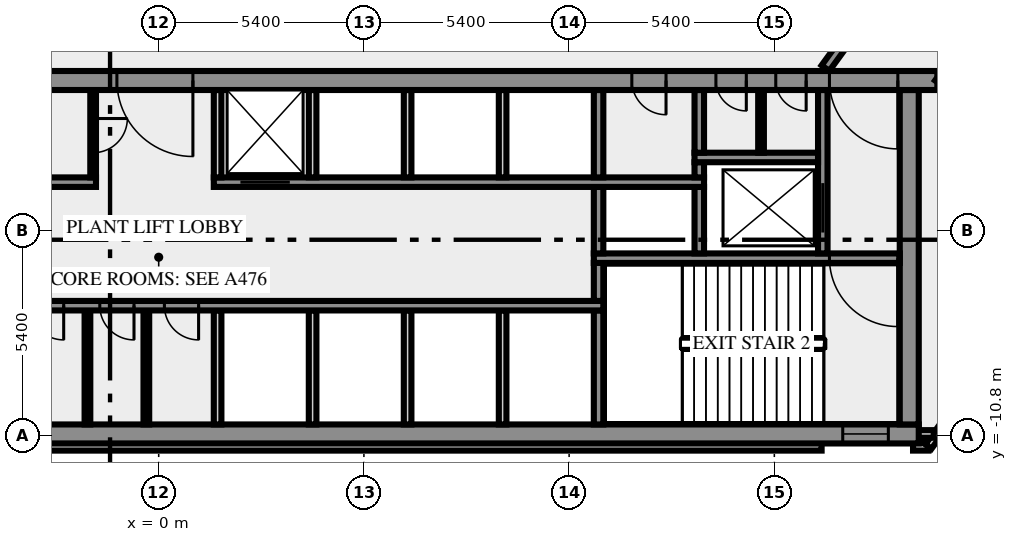
"""IFC4 building model, lengths in metres.
Left out: names, types, materials, properties, quantities, classifications, styles, units other than length and angle.
Written with IfcOpenShell. Run it as: python <this file> out.ifc"""

import sys

from ifc_helpers import new_model, si_unit, direction, frame, frame_2d, origin, place, context, subcontext, project, spatial, rectangle, extrude, element, fill, save


model = new_model("IFC4")
c1 = context("Model", 3, precision=1e-05, world=origin(), true_north=direction((0.0, 1.0)))
c2 = subcontext(c1, "Body", "Model", "MODEL_VIEW")
j1 = project(units=[si_unit("LENGTHUNIT", "METRE"), si_unit("PLANEANGLEUNIT", "RADIAN")], contexts=[c1])
p1 = place(None, origin())
s1 = spatial("IfcSite", under=j1, at=p1, CompositionType="ELEMENT")
p2 = place(p1, origin())
s2 = spatial("IfcBuilding", under=s1, at=p2, CompositionType="ELEMENT")
p3 = place(p2, frame((0.0, 0.0, 133.0)))
s3 = spatial("IfcBuildingStorey", under=s2, at=p3, CompositionType="ELEMENT", Elevation=133.0)
p4 = place(p3, frame((-17.444, -11.088, 0.0), z_axis=(0.0, 0.0, 1.0), x_axis=(1.0, 0.0, 0.0)))
e1 = element("IfcWall", 1, at=p4, inside=s3, PredefinedType="SOLIDWALL", context=c2, shape_type="SweptSolid", body=[
    extrude(rectangle(XDim=34.888, YDim=0.2, at=frame_2d((17.444, 0.0))), origin(), (0.0, 0.0, 1.0), 5.6),
])
p5 = place(p3, frame((19.85, -11.088, 0.0), z_axis=(0.0, 0.0, 1.0), x_axis=(1.0, 0.0, 0.0)))
e2 = element("IfcWall", 2, at=p5, inside=s3, PredefinedType="SOLIDWALL", context=c2, shape_type="SweptSolid", body=[
    extrude(rectangle(XDim=0.406, YDim=0.2, at=frame_2d((0.203, 0.0))), origin(), (0.0, 0.0, 1.0), 5.6),
])
p6 = place(p3, frame((20.253, -11.083, 0.0), z_axis=(0.0, 0.0, 1.0), x_axis=(0.587766567315, 0.809030569476, 0.0)))
e3 = element("IfcWall", 3, at=p6, inside=s3, PredefinedType="SOLIDWALL", context=c2, shape_type="SweptSolid", body=[
    extrude(rectangle(XDim=2.688, YDim=0.2, at=frame_2d((1.344, 0.0))), origin(), (0.0, 0.0, 1.0), 5.6),
])
p7 = place(p3, frame((19.98, -10.75, 0.0), z_axis=(0.0, 0.0, 1.0), x_axis=(1.0, 0.0, 0.0)))
e4 = element("IfcWall", 4, at=p7, inside=s3, PredefinedType="SOLIDWALL", context=c2, shape_type="SweptSolid", body=[
    extrude(rectangle(XDim=0.417, YDim=0.2, at=frame_2d((0.208, 0.0))), origin(), (0.0, 0.0, 1.0), 5.6),
])
p8 = place(p3, frame((-20.0, -10.75, 0.0), z_axis=(0.0, 0.0, 1.0), x_axis=(1.0, 0.0, 0.0)))
e5 = element("IfcWall", 5, at=p8, inside=s3, PredefinedType="SHEAR", context=c2, shape_type="SweptSolid", body=[
    extrude(rectangle(XDim=40.0, YDim=0.5, at=frame_2d((20.0, 0.0))), origin(), (0.0, 0.0, 1.0), 5.6),
])
p9 = place(p8, frame((0.8, 0.0, 1.0)))
e6 = element("IfcOpeningElement", 6, at=p9, cuts=e5, PredefinedType="OPENING", context=c2, shape_type="SweptSolid", body=[
    extrude(rectangle(XDim=1.2, YDim=1.2, at=frame_2d((0.6, 0.6))), frame((0.0, 0.26, 0.0), z_axis=(0.0, -1.0, 0.0), x_axis=(1.0, 0.0, 0.0)), (0.0, 0.0, 1.0), 0.52),
])
p10 = place(p8, frame((38.0, 0.0, 1.0)))
e7 = element("IfcOpeningElement", 7, at=p10, cuts=e5, PredefinedType="OPENING", context=c2, shape_type="SweptSolid", body=[
    extrude(rectangle(XDim=1.2, YDim=1.2, at=frame_2d((0.6, 0.6))), frame((0.0, 0.26, 0.0), z_axis=(0.0, -1.0, 0.0), x_axis=(1.0, 0.0, 0.0)), (0.0, 0.0, 1.0), 0.52),
])
for number, where, z_axis, x_axis in (
    (8, (-1.875, -10.5, 0.0), (0.0, 0.0, 1.0), (0.0, 1.0, 0.0)),
    (9, (-0.325, -10.5, 0.0), (0.0, 0.0, 1.0), (0.0, 1.0, 0.0)),
):
    element("IfcWall", number, at=place(p3, frame(where, z_axis=z_axis, x_axis=x_axis)), inside=s3, PredefinedType="PARTITIONING", context=c2, shape_type="SweptSolid", body=[
        extrude(rectangle(XDim=3.0, YDim=0.15, at=frame_2d((1.5, 0.0))), origin(), (0.0, 0.0, 1.0), 5.6),
    ])
for number, where, z_axis, x_axis in (
    (10, (1.55, -10.5, 0.0), (0.0, 0.0, 1.0), (0.0, 1.0, 0.0)),
    (11, (4.05, -10.5, 0.0), (0.0, 0.0, 1.0), (0.0, 1.0, 0.0)),
    (12, (6.55, -10.5, 0.0), (0.0, 0.0, 1.0), (0.0, 1.0, 0.0)),
    (13, (9.05, -10.5, 0.0), (0.0, 0.0, 1.0), (0.0, 1.0, 0.0)),
):
    element("IfcWall", number, at=place(p3, frame(where, z_axis=z_axis, x_axis=x_axis)), inside=s3, PredefinedType="SOLIDWALL", context=c2, shape_type="SweptSolid", body=[
        extrude(rectangle(XDim=3.0, YDim=0.2, at=frame_2d((1.5, 0.0))), origin(), (0.0, 0.0, 1.0), 5.6),
    ])
p11 = place(p3, frame((11.575, -10.5, 0.0), z_axis=(0.0, 0.0, 1.0), x_axis=(0.0, 1.0, 0.0)))
e14 = element("IfcWall", 14, at=p11, inside=s3, PredefinedType="SHEAR", context=c2, shape_type="SweptSolid", body=[
    extrude(rectangle(XDim=3.0, YDim=0.25, at=frame_2d((1.5, 0.0))), origin(), (0.0, 0.0, 1.0), 5.6),
])
p12 = place(p3, frame((19.75, -10.5, 0.0), z_axis=(0.0, 0.0, 1.0), x_axis=(0.0, 1.0, 0.0)))
e15 = element("IfcWall", 15, at=p12, inside=s3, PredefinedType="SHEAR", context=c2, shape_type="SweptSolid", body=[
    extrude(rectangle(XDim=8.8, YDim=0.5, at=frame_2d((4.4, 0.0))), origin(), (0.0, 0.0, 1.0), 5.6),
])
p13 = place(p3, frame((11.7, -7.375, 0.0), z_axis=(0.0, 0.0, 1.0), x_axis=(-1.0, 0.0, 0.0)))
e16 = element("IfcWall", 16, at=p13, inside=s3, PredefinedType="SHEAR", context=c2, shape_type="SweptSolid", body=[
    extrude(rectangle(XDim=23.4, YDim=0.25, at=frame_2d((11.7, 0.0))), origin(), (0.0, 0.0, 1.0), 5.6),
])
p14 = place(p13, frame((14.2, 0.0, 0.0)))
e17 = element("IfcOpeningElement", 17, at=p14, cuts=e16, PredefinedType="OPENING", context=c2, shape_type="SweptSolid", body=[
    extrude(rectangle(XDim=0.9, YDim=2.1, at=frame_2d((0.45, 1.05))), frame((0.0, 0.135, 0.0), z_axis=(0.0, -1.0, 0.0), x_axis=(1.0, 0.0, 0.0)), (0.0, 0.0, 1.0), 0.27),
])
p15 = place(p13, frame((12.35, 0.0, 0.0)))
e18 = element("IfcOpeningElement", 18, at=p15, cuts=e16, PredefinedType="OPENING", context=c2, shape_type="SweptSolid", body=[
    extrude(rectangle(XDim=0.9, YDim=2.1, at=frame_2d((0.45, 1.05))), frame((0.0, 0.135, 0.0), z_axis=(0.0, -1.0, 0.0), x_axis=(1.0, 0.0, 0.0)), (0.0, 0.0, 1.0), 0.27),
])
p16 = place(p13, frame((10.65, 0.0, 0.0)))
e19 = element("IfcOpeningElement", 19, at=p16, cuts=e16, PredefinedType="OPENING", context=c2, shape_type="SweptSolid", body=[
    extrude(rectangle(XDim=0.9, YDim=2.1, at=frame_2d((0.45, 1.05))), frame((0.0, 0.135, 0.0), z_axis=(0.0, -1.0, 0.0), x_axis=(1.0, 0.0, 0.0)), (0.0, 0.0, 1.0), 0.27),
])
p17 = place(p3, frame((11.575, -7.25, 0.0), z_axis=(0.0, 0.0, 1.0), x_axis=(0.0, 1.0, 0.0)))
e20 = element("IfcWall", 20, at=p17, inside=s3, PredefinedType="SHEAR", context=c2, shape_type="SweptSolid", body=[
    extrude(rectangle(XDim=1.0, YDim=0.25, at=frame_2d((0.5, 0.0))), origin(), (0.0, 0.0, 1.0), 5.6),
])
p18 = place(p3, frame((19.5, -6.125, 0.0), z_axis=(0.0, 0.0, 1.0), x_axis=(-1.0, 0.0, 0.0)))
e21 = element("IfcWall", 21, at=p18, inside=s3, PredefinedType="SHEAR", context=c2, shape_type="SweptSolid", body=[
    extrude(rectangle(XDim=8.05, YDim=0.25, at=frame_2d((4.025, 0.0))), origin(), (0.0, 0.0, 1.0), 5.6),
])
p19 = place(p18, frame((0.05, 0.0, 0.0)))
e22 = element("IfcOpeningElement", 22, at=p19, cuts=e21, PredefinedType="OPENING", context=c2, shape_type="SweptSolid", body=[
    extrude(rectangle(XDim=1.8, YDim=2.1, at=frame_2d((0.9, 1.05))), frame((0.0, 0.135, 0.0), z_axis=(0.0, -1.0, 0.0), x_axis=(1.0, 0.0, 0.0)), (0.0, 0.0, 1.0), 0.27),
])
for number, where, z_axis, x_axis in (
    (23, (11.575, -6.0, 0.0), (0.0, 0.0, 1.0), (0.0, 1.0, 0.0)),
    (24, (14.225, -6.0, 0.0), (0.0, 0.0, 1.0), (0.0, 1.0, 0.0)),
):
    element("IfcWall", number, at=place(p3, frame(where, z_axis=z_axis, x_axis=x_axis)), inside=s3, PredefinedType="SHEAR", context=c2, shape_type="SweptSolid", body=[
        extrude(rectangle(XDim=1.75, YDim=0.25, at=frame_2d((0.875, 0.0))), origin(), (0.0, 0.0, 1.0), 5.6),
    ])
p20 = place(p3, frame((17.475, -6.0, 0.0), z_axis=(0.0, 0.0, 1.0), x_axis=(0.0, 1.0, 0.0)))
e25 = element("IfcWall", 25, at=p20, inside=s3, PredefinedType="SHEAR", context=c2, shape_type="SweptSolid", body=[
    extrude(rectangle(XDim=4.3, YDim=0.25, at=frame_2d((2.15, 0.0))), origin(), (0.0, 0.0, 1.0), 5.6),
])
p21 = place(p20, frame((0.55, 0.0, 0.0)))
e26 = element("IfcOpeningElement", 26, at=p21, cuts=e25, PredefinedType="OPENING", context=c2, shape_type="SweptSolid", body=[
    extrude(rectangle(XDim=1.3, YDim=2.1, at=frame_2d((0.65, 1.05))), frame((0.0, 0.135, 0.0), z_axis=(0.0, -1.0, 0.0), x_axis=(1.0, 0.0, 0.0)), (0.0, 0.0, 1.0), 0.27),
])
p22 = place(p3, frame((-14.35, -4.125, 0.0), z_axis=(0.0, 0.0, 1.0), x_axis=(1.0, 0.0, 0.0)))
e27 = element("IfcWall", 27, at=p22, inside=s3, PredefinedType="SHEAR", context=c2, shape_type="SweptSolid", body=[
    extrude(rectangle(XDim=12.7, YDim=0.25, at=frame_2d((6.35, 0.0))), origin(), (0.0, 0.0, 1.0), 5.6),
])
p23 = place(p3, frame((1.45, -4.125, 0.0), z_axis=(0.0, 0.0, 1.0), x_axis=(1.0, 0.0, 0.0)))
e28 = element("IfcWall", 28, at=p23, inside=s3, PredefinedType="SHEAR", context=c2, shape_type="SweptSolid", body=[
    extrude(rectangle(XDim=12.9, YDim=0.25, at=frame_2d((6.45, 0.0))), origin(), (0.0, 0.0, 1.0), 5.6),
])
p24 = place(p23, frame((0.7, 0.0, 0.0)))
e29 = element("IfcOpeningElement", 29, at=p24, cuts=e28, PredefinedType="OPENING", context=c2, shape_type="SweptSolid", body=[
    extrude(rectangle(XDim=1.3, YDim=2.1, at=frame_2d((0.65, 1.05))), frame((0.0, 0.135, 0.0), z_axis=(0.0, -1.0, 0.0), x_axis=(1.0, 0.0, 0.0)), (0.0, 0.0, 1.0), 0.27),
])
p25 = place(p3, frame((-1.725, -1.7, 0.0), z_axis=(0.0, 0.0, 1.0), x_axis=(0.0, -1.0, 0.0)))
e30 = element("IfcWall", 30, at=p25, inside=s3, PredefinedType="PARTITIONING", context=c2, shape_type="SweptSolid", body=[
    extrude(rectangle(XDim=2.3, YDim=0.15, at=frame_2d((1.15, 0.0))), origin(), (0.0, 0.0, 1.0), 5.6),
])
p26 = place(p25, frame((0.75, 0.0, 0.0)))
e31 = element("IfcOpeningElement", 31, at=p26, cuts=e30, PredefinedType="OPENING", context=c2, shape_type="SweptSolid", body=[
    extrude(rectangle(XDim=0.9, YDim=2.1, at=frame_2d((0.45, 1.05))), frame((0.0, 0.085, 0.0), z_axis=(0.0, -1.0, 0.0), x_axis=(1.0, 0.0, 0.0)), (0.0, 0.0, 1.0), 0.17),
])
for number, where, z_axis, x_axis in (
    (32, (1.55, -4.0, 0.0), (0.0, 0.0, 1.0), (0.0, 1.0, 0.0)),
    (33, (4.05, -4.0, 0.0), (0.0, 0.0, 1.0), (0.0, 1.0, 0.0)),
    (34, (6.55, -4.0, 0.0), (0.0, 0.0, 1.0), (0.0, 1.0, 0.0)),
    (35, (9.05, -4.0, 0.0), (0.0, 0.0, 1.0), (0.0, 1.0, 0.0)),
):
    element("IfcWall", number, at=place(p3, frame(where, z_axis=z_axis, x_axis=x_axis)), inside=s3, PredefinedType="SOLIDWALL", context=c2, shape_type="SweptSolid", body=[
        extrude(rectangle(XDim=2.3, YDim=0.2, at=frame_2d((1.15, 0.0))), origin(), (0.0, 0.0, 1.0), 5.6),
    ])
p27 = place(p3, frame((11.575, -4.0, 0.0), z_axis=(0.0, 0.0, 1.0), x_axis=(0.0, 1.0, 0.0)))
e36 = element("IfcWall", 36, at=p27, inside=s3, PredefinedType="SHEAR", context=c2, shape_type="SweptSolid", body=[
    extrude(rectangle(XDim=2.3, YDim=0.25, at=frame_2d((1.15, 0.0))), origin(), (0.0, 0.0, 1.0), 5.6),
])
p28 = place(p3, frame((14.225, -4.0, 0.0), z_axis=(0.0, 0.0, 1.0), x_axis=(0.0, 1.0, 0.0)))
e37 = element("IfcWall", 37, at=p28, inside=s3, PredefinedType="SHEAR", context=c2, shape_type="SweptSolid", body=[
    extrude(rectangle(XDim=0.4, YDim=0.25, at=frame_2d((0.2, 0.0))), origin(), (0.0, 0.0, 1.0), 5.6),
])
p29 = place(p3, frame((14.1, -3.475, 0.0), z_axis=(0.0, 0.0, 1.0), x_axis=(1.0, 0.0, 0.0)))
e38 = element("IfcWall", 38, at=p29, inside=s3, PredefinedType="SHEAR", context=c2, shape_type="SweptSolid", body=[
    extrude(rectangle(XDim=3.25, YDim=0.25, at=frame_2d((1.625, 0.0))), origin(), (0.0, 0.0, 1.0), 5.6),
])
p30 = place(p3, frame((14.225, -3.35, 0.0), z_axis=(0.0, 0.0, 1.0), x_axis=(0.0, 1.0, 0.0)))
e39 = element("IfcWall", 39, at=p30, inside=s3, PredefinedType="SHEAR", context=c2, shape_type="SweptSolid", body=[
    extrude(rectangle(XDim=1.65, YDim=0.25, at=frame_2d((0.825, 0.0))), origin(), (0.0, 0.0, 1.0), 5.6),
])
p31 = place(p3, frame((15.85, -3.35, 0.0), z_axis=(0.0, 0.0, 1.0), x_axis=(0.0, 1.0, 0.0)))
e40 = element("IfcWall", 40, at=p31, inside=s3, PredefinedType="PARTITIONING", context=c2, shape_type="SweptSolid", body=[
    extrude(rectangle(XDim=1.65, YDim=0.15, at=frame_2d((0.825, 0.0))), origin(), (0.0, 0.0, 1.0), 5.6),
])
p32 = place(p3, frame((20.49, -1.45, 0.0), z_axis=(0.0, 0.0, 1.0), x_axis=(-1.0, 0.0, 0.0)))
e41 = element("IfcWall", 41, at=p32, inside=s3, PredefinedType="SHEAR", context=c2, shape_type="SweptSolid", body=[
    extrude(rectangle(XDim=40.98, YDim=0.5, at=frame_2d((20.49, 0.0))), origin(), (0.0, 0.0, 1.0), 5.6),
])
p33 = place(p32, frame((38.14, 0.0, 0.0)))
e42 = element("IfcOpeningElement", 42, at=p33, cuts=e41, PredefinedType="OPENING", context=c2, shape_type="SweptSolid", body=[
    extrude(rectangle(XDim=1.8, YDim=2.1, at=frame_2d((0.9, 1.05))), frame((0.0, 0.26, 0.0), z_axis=(0.0, -1.0, 0.0), x_axis=(1.0, 0.0, 0.0)), (0.0, 0.0, 1.0), 0.52),
])
p34 = place(p32, frame((35.89, 0.0, 0.0)))
e43 = element("IfcOpeningElement", 43, at=p34, cuts=e41, PredefinedType="OPENING", context=c2, shape_type="SweptSolid", body=[
    extrude(rectangle(XDim=0.9, YDim=2.1, at=frame_2d((0.45, 1.05))), frame((0.0, 0.26, 0.0), z_axis=(0.0, -1.0, 0.0), x_axis=(1.0, 0.0, 0.0)), (0.0, 0.0, 1.0), 0.52),
])
p35 = place(p32, frame((32.94, 0.0, 0.0)))
e44 = element("IfcOpeningElement", 44, at=p35, cuts=e41, PredefinedType="OPENING", context=c2, shape_type="SweptSolid", body=[
    extrude(rectangle(XDim=0.9, YDim=2.1, at=frame_2d((0.45, 1.05))), frame((0.0, 0.26, 0.0), z_axis=(0.0, -1.0, 0.0), x_axis=(1.0, 0.0, 0.0)), (0.0, 0.0, 1.0), 0.52),
])
p36 = place(p32, frame((19.59, 0.0, 0.0)))
e45 = element("IfcOpeningElement", 45, at=p36, cuts=e41, PredefinedType="OPENING", context=c2, shape_type="SweptSolid", body=[
    extrude(rectangle(XDim=2.0, YDim=2.1, at=frame_2d((1.0, 1.05))), frame((0.0, 0.26, 0.0), z_axis=(0.0, -1.0, 0.0), x_axis=(1.0, 0.0, 0.0)), (0.0, 0.0, 1.0), 0.52),
])
p37 = place(p32, frame((7.14, 0.0, 0.0)))
e46 = element("IfcOpeningElement", 46, at=p37, cuts=e41, PredefinedType="OPENING", context=c2, shape_type="SweptSolid", body=[
    extrude(rectangle(XDim=0.9, YDim=2.1, at=frame_2d((0.45, 1.05))), frame((0.0, 0.26, 0.0), z_axis=(0.0, -1.0, 0.0), x_axis=(1.0, 0.0, 0.0)), (0.0, 0.0, 1.0), 0.52),
])
p38 = place(p32, frame((5.028, 0.0, 0.0)))
e47 = element("IfcOpeningElement", 47, at=p38, cuts=e41, PredefinedType="OPENING", context=c2, shape_type="SweptSolid", body=[
    extrude(rectangle(XDim=0.8, YDim=2.1, at=frame_2d((0.4, 1.05))), frame((0.0, 0.26, 0.0), z_axis=(0.0, -1.0, 0.0), x_axis=(1.0, 0.0, 0.0)), (0.0, 0.0, 1.0), 0.52),
])
p39 = place(p32, frame((3.452, 0.0, 0.0)))
e48 = element("IfcOpeningElement", 48, at=p39, cuts=e41, PredefinedType="OPENING", context=c2, shape_type="SweptSolid", body=[
    extrude(rectangle(XDim=0.8, YDim=2.1, at=frame_2d((0.4, 1.05))), frame((0.0, 0.26, 0.0), z_axis=(0.0, -1.0, 0.0), x_axis=(1.0, 0.0, 0.0)), (0.0, 0.0, 1.0), 0.52),
])
p40 = place(p32, frame((1.04, 0.0, 0.0)))
e49 = element("IfcOpeningElement", 49, at=p40, cuts=e41, PredefinedType="OPENING", context=c2, shape_type="SweptSolid", body=[
    extrude(rectangle(XDim=1.8, YDim=2.1, at=frame_2d((0.9, 1.05))), frame((0.0, 0.26, 0.0), z_axis=(0.0, -1.0, 0.0), x_axis=(1.0, 0.0, 0.0)), (0.0, 0.0, 1.0), 0.52),
])
p41 = place(p3, frame((40.584, 26.078, 0.0), z_axis=(0.0, 0.0, 1.0), x_axis=(-0.587782727964, -0.809018828401, 0.0)))
e50 = element("IfcWall", 50, at=p41, inside=s3, PredefinedType="SOLIDWALL", context=c2, shape_type="SweptSolid", body=[
    extrude(rectangle(XDim=34.117, YDim=0.25, at=frame_2d((17.058, 0.0))), origin(), (0.0, 0.0, 1.0), 5.6),
])
p42 = place(p41, frame((24.667, 0.0, 0.0)))
e51 = element("IfcOpeningElement", 51, at=p42, cuts=e50, PredefinedType="OPENING", context=c2, shape_type="SweptSolid", body=[
    extrude(rectangle(XDim=1.8, YDim=2.1, at=frame_2d((0.9, 1.05))), frame((0.0, 0.135, 0.0), z_axis=(0.0, -1.0, 0.0), x_axis=(1.0, 0.0, 0.0)), (0.0, 0.0, 1.0), 0.27),
])
p43 = place(p41, frame((15.651, 0.0, 0.0)))
e52 = element("IfcOpeningElement", 52, at=p43, cuts=e50, PredefinedType="OPENING", context=c2, shape_type="SweptSolid", body=[
    extrude(rectangle(XDim=1.2, YDim=2.1, at=frame_2d((0.6, 1.05))), frame((0.0, 0.135, 0.0), z_axis=(0.0, -1.0, 0.0), x_axis=(1.0, 0.0, 0.0)), (0.0, 0.0, 1.0), 0.27),
])
p44 = place(p3, frame((17.545, -1.125, 0.0), z_axis=(0.0, 0.0, 1.0), x_axis=(0.587787785895, 0.809015153599, 0.0)))
e53 = element("IfcWall", 53, at=p44, inside=s3, PredefinedType="SOLIDWALL", context=c2, shape_type="SweptSolid", body=[
    extrude(rectangle(XDim=35.549, YDim=0.25, at=frame_2d((17.775, 0.0))), origin(), (0.0, 0.0, 1.0), 5.6),
])
p45 = place(p44, frame((17.207, 0.0, 0.0)))
e54 = element("IfcOpeningElement", 54, at=p45, cuts=e53, PredefinedType="OPENING", context=c2, shape_type="SweptSolid", body=[
    extrude(rectangle(XDim=1.2, YDim=2.1, at=frame_2d((0.6, 1.05))), frame((0.0, 0.135, 0.0), z_axis=(0.0, -1.0, 0.0), x_axis=(1.0, 0.0, 0.0)), (0.0, 0.0, 1.0), 0.27),
])
p46 = place(p44, frame((25.906, 0.0, 0.0)))
e55 = element("IfcOpeningElement", 55, at=p46, cuts=e53, PredefinedType="OPENING", context=c2, shape_type="SweptSolid", body=[
    extrude(rectangle(XDim=1.8, YDim=2.1, at=frame_2d((0.9, 1.05))), frame((0.0, 0.135, 0.0), z_axis=(0.0, -1.0, 0.0), x_axis=(1.0, 0.0, 0.0)), (0.0, 0.0, 1.0), 0.27),
])
p47 = place(p10, origin())
e56 = element("IfcWindow", 56, at=p47, inside=s3, PartitioningType="SINGLE_PANEL", PredefinedType="WINDOW", context=c2, shape_type="SweptSolid", body=[
    extrude(rectangle(XDim=1.2, YDim=1.2, at=frame_2d((0.6, 0.6))), frame((0.0, 0.03, 0.0), z_axis=(0.0, -1.0, 0.0), x_axis=(1.0, 0.0, 0.0)), (0.0, 0.0, 1.0), 0.06),
])
fill(e7, e56)
p48 = place(p14, origin())
e57 = element("IfcDoor", 57, at=p48, inside=s3, OperationType="SINGLE_SWING_RIGHT", PredefinedType="DOOR", context=c2, shape_type="SweptSolid", body=[
    extrude(rectangle(XDim=0.9, YDim=2.1, at=frame_2d((0.45, 1.05))), frame((0.0, 0.025, 0.0), z_axis=(0.0, -1.0, 0.0), x_axis=(1.0, 0.0, 0.0)), (0.0, 0.0, 1.0), 0.05),
])
fill(e17, e57)
p49 = place(p15, origin())
e58 = element("IfcDoor", 58, at=p49, inside=s3, OperationType="SINGLE_SWING_RIGHT", PredefinedType="DOOR", context=c2, shape_type="SweptSolid", body=[
    extrude(rectangle(XDim=0.9, YDim=2.1, at=frame_2d((0.45, 1.05))), frame((0.0, 0.025, 0.0), z_axis=(0.0, -1.0, 0.0), x_axis=(1.0, 0.0, 0.0)), (0.0, 0.0, 1.0), 0.05),
])
fill(e18, e58)
p50 = place(p16, origin())
e59 = element("IfcDoor", 59, at=p50, inside=s3, OperationType="SINGLE_SWING_LEFT", PredefinedType="DOOR", context=c2, shape_type="SweptSolid", body=[
    extrude(rectangle(XDim=0.9, YDim=2.1, at=frame_2d((0.45, 1.05))), frame((0.0, 0.025, 0.0), z_axis=(0.0, -1.0, 0.0), x_axis=(1.0, 0.0, 0.0)), (0.0, 0.0, 1.0), 0.05),
])
fill(e19, e59)
p51 = place(p19, origin())
e60 = element("IfcDoor", 60, at=p51, inside=s3, OperationType="DOUBLE_DOOR_SINGLE_SWING", PredefinedType="DOOR", context=c2, shape_type="SweptSolid", body=[
    extrude(rectangle(XDim=1.8, YDim=2.1, at=frame_2d((0.9, 1.05))), frame((0.0, 0.025, 0.0), z_axis=(0.0, -1.0, 0.0), x_axis=(1.0, 0.0, 0.0)), (0.0, 0.0, 1.0), 0.05),
])
fill(e22, e60)
p52 = place(p21, origin())
e61 = element("IfcDoor", 61, at=p52, inside=s3, OperationType="DOUBLE_DOOR_SLIDING", PredefinedType="DOOR", context=c2, shape_type="SweptSolid", body=[
    extrude(rectangle(XDim=1.3, YDim=2.1, at=frame_2d((0.65, 1.05))), frame((0.0, 0.025, 0.0), z_axis=(0.0, -1.0, 0.0), x_axis=(1.0, 0.0, 0.0)), (0.0, 0.0, 1.0), 0.05),
])
fill(e26, e61)
p53 = place(p24, origin())
e62 = element("IfcDoor", 62, at=p53, inside=s3, OperationType="DOUBLE_DOOR_SLIDING", PredefinedType="DOOR", context=c2, shape_type="SweptSolid", body=[
    extrude(rectangle(XDim=1.3, YDim=2.1, at=frame_2d((0.65, 1.05))), frame((0.0, 0.025, 0.0), z_axis=(0.0, -1.0, 0.0), x_axis=(1.0, 0.0, 0.0)), (0.0, 0.0, 1.0), 0.05),
])
fill(e29, e62)
p54 = place(p26, origin())
e63 = element("IfcDoor", 63, at=p54, inside=s3, OperationType="SINGLE_SWING_RIGHT", PredefinedType="DOOR", context=c2, shape_type="SweptSolid", body=[
    extrude(rectangle(XDim=0.9, YDim=2.1, at=frame_2d((0.45, 1.05))), frame((0.0, 0.025, 0.0), z_axis=(0.0, -1.0, 0.0), x_axis=(1.0, 0.0, 0.0)), (0.0, 0.0, 1.0), 0.05),
])
fill(e31, e63)
p55 = place(p36, origin())
e64 = element("IfcDoor", 64, at=p55, inside=s3, OperationType="DOUBLE_DOOR_SINGLE_SWING", PredefinedType="DOOR", context=c2, shape_type="SweptSolid", body=[
    extrude(rectangle(XDim=2.0, YDim=2.1, at=frame_2d((1.0, 1.05))), frame((0.0, 0.025, 0.0), z_axis=(0.0, -1.0, 0.0), x_axis=(1.0, 0.0, 0.0)), (0.0, 0.0, 1.0), 0.05),
])
fill(e45, e64)
p56 = place(p37, origin())
e65 = element("IfcDoor", 65, at=p56, inside=s3, OperationType="SINGLE_SWING_LEFT", PredefinedType="DOOR", context=c2, shape_type="SweptSolid", body=[
    extrude(rectangle(XDim=0.9, YDim=2.1, at=frame_2d((0.45, 1.05))), frame((0.0, 0.025, 0.0), z_axis=(0.0, -1.0, 0.0), x_axis=(1.0, 0.0, 0.0)), (0.0, 0.0, 1.0), 0.05),
])
fill(e46, e65)
p57 = place(p38, origin())
e66 = element("IfcDoor", 66, at=p57, inside=s3, OperationType="SINGLE_SWING_LEFT", PredefinedType="DOOR", context=c2, shape_type="SweptSolid", body=[
    extrude(rectangle(XDim=0.8, YDim=2.1, at=frame_2d((0.4, 1.05))), frame((0.0, 0.025, 0.0), z_axis=(0.0, -1.0, 0.0), x_axis=(1.0, 0.0, 0.0)), (0.0, 0.0, 1.0), 0.05),
])
fill(e47, e66)
p58 = place(p39, origin())
e67 = element("IfcDoor", 67, at=p58, inside=s3, OperationType="SINGLE_SWING_LEFT", PredefinedType="DOOR", context=c2, shape_type="SweptSolid", body=[
    extrude(rectangle(XDim=0.8, YDim=2.1, at=frame_2d((0.4, 1.05))), frame((0.0, 0.025, 0.0), z_axis=(0.0, -1.0, 0.0), x_axis=(1.0, 0.0, 0.0)), (0.0, 0.0, 1.0), 0.05),
])
fill(e48, e67)
p59 = place(p40, origin())
e68 = element("IfcDoor", 68, at=p59, inside=s3, OperationType="DOUBLE_DOOR_SINGLE_SWING", PredefinedType="DOOR", context=c2, shape_type="SweptSolid", body=[
    extrude(rectangle(XDim=1.8, YDim=2.1, at=frame_2d((0.9, 1.05))), frame((0.0, 0.025, 0.0), z_axis=(0.0, -1.0, 0.0), x_axis=(1.0, 0.0, 0.0)), (0.0, 0.0, 1.0), 0.05),
])
fill(e49, e68)
save(model, sys.argv[1])
